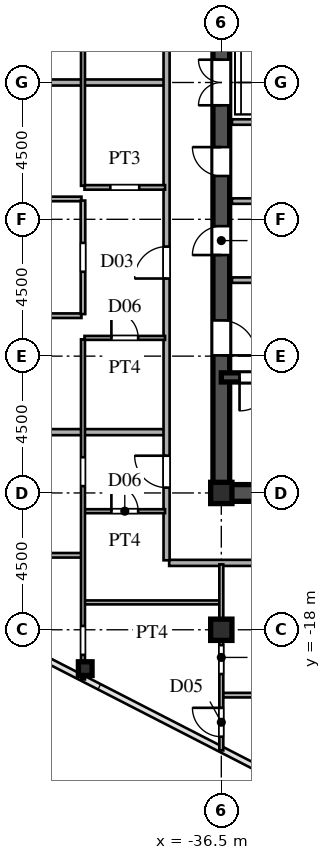
"""IFC4 building model, lengths in metres.
Left out: names, types, materials, properties, quantities, classifications, styles, units other than length and angle.
Written with IfcOpenShell. Run it as: python <this file> out.ifc"""

import sys

from ifc_helpers import new_model, si_unit, direction, frame, frame_2d, origin, origin_2d, place, context, subcontext, project, spatial, rectangle, hollow_rectangle, i_section, extrude, source, transform, mapped, element, fill, save


model = new_model("IFC4")
c1 = context("Model", 3, precision=1e-05, world=origin(), true_north=direction((0.0, 1.0)))
c2 = subcontext(c1, "Body", "Model", "MODEL_VIEW")
j1 = project(units=[si_unit("LENGTHUNIT", "METRE"), si_unit("PLANEANGLEUNIT", "RADIAN")], contexts=[c1])
p1 = place(None, origin())
s1 = spatial("IfcSite", under=j1, at=p1, CompositionType="ELEMENT")
p2 = place(p1, origin())
s2 = spatial("IfcBuilding", under=s1, at=p2, CompositionType="ELEMENT")
p3 = place(p2, frame((0.0, 0.0, 147.6)))
s3 = spatial("IfcBuildingStorey", under=s2, at=p3, CompositionType="ELEMENT", Elevation=147.6)
m1 = source(origin(), c2, "Body", "SweptSolid", [
    extrude(i_section(OverallWidth=0.7, OverallDepth=0.7, WebThickness=0.028, FlangeThickness=0.045, at=origin_2d()), origin(), (0.0, 0.0, 1.0), 3.6),
])
for number, where, z_axis, x_axis in (
    (1, (-36.5, -18.0, 0.0), (0.0, 0.0, 1.0), (1.0, 0.0, 0.0)),
    (2, (-36.5, -13.5, 0.0), (0.0, 0.0, 1.0), (1.0, 0.0, 0.0)),
):
    element("IfcColumn", number, at=place(p3, frame(where, z_axis=z_axis, x_axis=x_axis)), inside=s3, PredefinedType="COLUMN", context=c2, shape_type="MappedRepresentation", body=[
        mapped(m1, transform((0.0, 0.0, 0.0), scale=1.0)),
    ])
m2 = source(origin(), c2, "Body", "SweptSolid", [
    extrude(hollow_rectangle(XDim=0.45, YDim=0.45, WallThickness=0.018, at=origin_2d()), origin(), (0.0, 0.0, 1.0), 3.6),
])
p4 = place(p3, frame((-40.976, -19.278, 0.0), z_axis=(0.0, 0.0, 1.0), x_axis=(1.0, 0.0, 0.0)))
e3 = element("IfcColumn", 3, at=p4, inside=s3, PredefinedType="COLUMN", context=c2, shape_type="MappedRepresentation", body=[
    mapped(m2, transform((0.0, 0.0, 0.0), scale=1.0)),
])
p5 = place(p3, frame((-36.5, -13.5, 0.0), z_axis=(0.0, 0.0, 1.0), x_axis=(1.0, 0.0, 0.0)))
e4 = element("IfcWall", 4, at=p5, inside=s3, PredefinedType="SHEAR", context=c2, shape_type="SweptSolid", body=[
    extrude(rectangle(XDim=9.0, YDim=0.55, at=frame_2d((4.5, 0.0))), origin(), (0.0, 0.0, 1.0), 3.38),
])
p6 = place(p3, frame((-36.5, -13.65, 0.0), z_axis=(0.0, 0.0, 1.0), x_axis=(0.0, 1.0, 0.0)))
e5 = element("IfcWall", 5, at=p6, inside=s3, PredefinedType="SHEAR", context=c2, shape_type="SweptSolid", body=[
    extrude(rectangle(XDim=7.15, YDim=0.55, at=frame_2d((3.575, 0.0))), origin(), (0.0, 0.0, 1.0), 3.38),
])
p7 = place(p6, frame((4.675, 0.0, 0.0)))
e6 = element("IfcOpeningElement", 6, at=p7, cuts=e5, PredefinedType="OPENING", context=c2, shape_type="SweptSolid", body=[
    extrude(rectangle(XDim=1.15, YDim=2.2, at=frame_2d((0.575, 1.1))), frame((0.0, 0.285, 0.0), z_axis=(0.0, -1.0, 0.0), x_axis=(1.0, 0.0, 0.0)), (0.0, 0.0, 1.0), 0.57),
])
p8 = place(p3, frame((-36.5, -1.3, 0.0), z_axis=(0.0, 0.0, 1.0), x_axis=(0.0, 1.0, 0.0)))
e7 = element("IfcWall", 7, at=p8, inside=s3, PredefinedType="SHEAR", context=c2, shape_type="SweptSolid", body=[
    extrude(rectangle(XDim=2.6, YDim=0.55, at=frame_2d((1.3, 0.0))), origin(), (0.0, 0.0, 1.0), 3.38),
])
p9 = place(p8, frame((0.55, 0.0, 0.0)))
e8 = element("IfcOpeningElement", 8, at=p9, cuts=e7, PredefinedType="OPENING", context=c2, shape_type="SweptSolid", body=[
    extrude(rectangle(XDim=1.5, YDim=2.3, at=frame_2d((0.75, 1.15))), frame((0.0, 0.285, 0.0), z_axis=(0.0, -1.0, 0.0), x_axis=(1.0, 0.0, 0.0)), (0.0, 0.0, 1.0), 0.57),
])
p10 = place(p3, frame((-36.5, -6.5, 0.0), z_axis=(0.0, 0.0, 1.0), x_axis=(0.0, 1.0, 0.0)))
e9 = element("IfcWall", 9, at=p10, inside=s3, PredefinedType="SHEAR", context=c2, shape_type="SweptSolid", body=[
    extrude(rectangle(XDim=2.6, YDim=0.55, at=frame_2d((1.3, 0.0))), origin(), (0.0, 0.0, 1.0), 3.38),
])
p11 = place(p10, frame((0.825, 0.0, 0.0)))
e10 = element("IfcOpeningElement", 10, at=p11, cuts=e9, PredefinedType="OPENING", context=c2, shape_type="SweptSolid", body=[
    extrude(rectangle(XDim=0.95, YDim=2.15, at=frame_2d((0.475, 1.075))), frame((0.0, 0.285, 0.0), z_axis=(0.0, -1.0, 0.0), x_axis=(1.0, 0.0, 0.0)), (0.0, 0.0, 1.0), 0.57),
])
p12 = place(p3, frame((-36.5, -3.9, 0.0), z_axis=(0.0, 0.0, 1.0), x_axis=(0.0, 1.0, 0.0)))
e11 = element("IfcWall", 11, at=p12, inside=s3, PredefinedType="SHEAR", context=c2, shape_type="SweptSolid", body=[
    extrude(rectangle(XDim=2.6, YDim=0.55, at=frame_2d((1.3, 0.0))), origin(), (0.0, 0.0, 1.0), 3.38),
])
p13 = place(p12, frame((0.825, 0.0, 0.0)))
e12 = element("IfcOpeningElement", 12, at=p13, cuts=e11, PredefinedType="OPENING", context=c2, shape_type="SweptSolid", body=[
    extrude(rectangle(XDim=0.95, YDim=2.15, at=frame_2d((0.475, 1.075))), frame((0.0, 0.285, 0.0), z_axis=(0.0, -1.0, 0.0), x_axis=(1.0, 0.0, 0.0)), (0.0, 0.0, 1.0), 0.57),
])
p14 = place(p3, frame((-36.5, -9.7, 0.0), z_axis=(0.0, 0.0, 1.0), x_axis=(1.0, 0.0, 0.0)))
e13 = element("IfcWall", 13, at=p14, inside=s3, PredefinedType="SHEAR", context=c2, shape_type="SweptSolid", body=[
    extrude(rectangle(XDim=9.0, YDim=0.3, at=frame_2d((4.5, 0.0))), origin(), (0.0, 0.0, 1.0), 3.38),
])
p15 = place(p14, frame((0.6, 0.0, 0.0)))
e14 = element("IfcOpeningElement", 14, at=p15, cuts=e13, PredefinedType="OPENING", context=c2, shape_type="SweptSolid", body=[
    extrude(rectangle(XDim=1.1, YDim=2.2, at=frame_2d((0.55, 1.1))), frame((0.0, 0.16, 0.0), z_axis=(0.0, -1.0, 0.0), x_axis=(1.0, 0.0, 0.0)), (0.0, 0.0, 1.0), 0.32),
])
p16 = place(p3, frame((-36.15, -6.5, 0.0), z_axis=(0.0, 0.0, 1.0), x_axis=(1.0, 0.0, 0.0)))
e15 = element("IfcWall", 15, at=p16, inside=s3, PredefinedType="PARTITIONING", context=c2, shape_type="SweptSolid", body=[
    extrude(rectangle(XDim=5.7, YDim=0.18, at=frame_2d((2.85, 0.0))), origin(), (0.0, 0.0, 1.0), 3.38),
])
for number, where, z_axis, x_axis in (
    (16, (-36.15, -1.3, 0.0), (0.0, 0.0, 1.0), (1.0, 0.0, 0.0)),
    (17, (-36.15, -3.9, 0.0), (0.0, 0.0, 1.0), (1.0, 0.0, 0.0)),
):
    element("IfcWall", number, at=place(p3, frame(where, z_axis=z_axis, x_axis=x_axis)), inside=s3, PredefinedType="PARTITIONING", context=c2, shape_type="SweptSolid", body=[
        extrude(rectangle(XDim=2.95, YDim=0.18, at=frame_2d((1.475, 0.0))), origin(), (0.0, 0.0, 1.0), 3.38),
    ])
p17 = place(p3, frame((-36.45, -20.15, 0.0), z_axis=(0.0, 0.0, 1.0), x_axis=(1.0, 0.0, 0.0)))
e18 = element("IfcWall", 18, at=p17, inside=s3, PredefinedType="PARTITIONING", context=c2, shape_type="SweptSolid", body=[
    extrude(rectangle(XDim=8.649, YDim=0.15, at=frame_2d((4.325, 0.0))), origin(), (0.0, 0.0, 1.0), 3.38),
])
p18 = place(p3, frame((-41.0, -17.1, 0.0), z_axis=(0.0, 0.0, 1.0), x_axis=(1.0, 0.0, 0.0)))
e19 = element("IfcWall", 19, at=p18, inside=s3, PredefinedType="PARTITIONING", context=c2, shape_type="SweptSolid", body=[
    extrude(rectangle(XDim=4.45, YDim=0.13, at=frame_2d((2.225, 0.0))), origin(), (0.0, 0.0, 1.0), 3.38),
])
p19 = place(p3, frame((-38.215, -15.8, 0.0), z_axis=(0.0, 0.0, 1.0), x_axis=(1.0, 0.0, 0.0)))
e20 = element("IfcWall", 20, at=p19, inside=s3, PredefinedType="PARTITIONING", context=c2, shape_type="SweptSolid", body=[
    extrude(rectangle(XDim=10.715, YDim=0.2, at=frame_2d((5.357, 0.0))), origin(), (0.0, 0.0, 1.0), 3.38),
])
p20 = place(p3, frame((-48.977, -15.55, 0.0), z_axis=(0.0, 0.0, 1.0), x_axis=(1.0, 0.0, 0.0)))
e21 = element("IfcWall", 21, at=p20, inside=s3, PredefinedType="PARTITIONING", context=c2, shape_type="SweptSolid", body=[
    extrude(rectangle(XDim=7.877, YDim=0.15, at=frame_2d((3.938, 0.0))), origin(), (0.0, 0.0, 1.0), 3.38),
])
p21 = place(p20, frame((3.506, 0.0, 0.0)))
e22 = element("IfcOpeningElement", 22, at=p21, cuts=e21, PredefinedType="OPENING", context=c2, shape_type="SweptSolid", body=[
    extrude(rectangle(XDim=0.95, YDim=2.15, at=frame_2d((0.475, 1.075))), frame((0.0, 0.085, 0.0), z_axis=(0.0, -1.0, 0.0), x_axis=(1.0, 0.0, 0.0)), (0.0, 0.0, 1.0), 0.17),
])
p22 = place(p3, frame((-41.0, -14.1, 0.0), z_axis=(0.0, 0.0, 1.0), x_axis=(1.0, 0.0, 0.0)))
e23 = element("IfcWall", 23, at=p22, inside=s3, PredefinedType="PARTITIONING", context=c2, shape_type="SweptSolid", body=[
    extrude(rectangle(XDim=2.65, YDim=0.13, at=frame_2d((1.325, 0.0))), origin(), (0.0, 0.0, 1.0), 3.38),
])
p23 = place(p22, frame((0.885, 0.0, 0.0)))
e24 = element("IfcOpeningElement", 24, at=p23, cuts=e23, PredefinedType="OPENING", context=c2, shape_type="SweptSolid", body=[
    extrude(rectangle(XDim=0.88, YDim=2.1, at=frame_2d((0.44, 1.05))), frame((0.0, 0.075, 0.0), z_axis=(0.0, -1.0, 0.0), x_axis=(1.0, 0.0, 0.0)), (0.0, 0.0, 1.0), 0.15),
])
p24 = place(p3, frame((-56.844, -11.5, 0.0), z_axis=(0.0, 0.0, 1.0), x_axis=(1.0, 0.0, 0.0)))
e25 = element("IfcWall", 25, at=p24, inside=s3, PredefinedType="PARTITIONING", context=c2, shape_type="SweptSolid", body=[
    extrude(rectangle(XDim=18.464, YDim=0.2, at=frame_2d((9.232, 0.0))), origin(), (0.0, 0.0, 1.0), 3.38),
])
p25 = place(p3, frame((-41.0, -8.4, 0.0), z_axis=(0.0, 0.0, 1.0), x_axis=(1.0, 0.0, 0.0)))
e26 = element("IfcWall", 26, at=p25, inside=s3, PredefinedType="PARTITIONING", context=c2, shape_type="SweptSolid", body=[
    extrude(rectangle(XDim=2.65, YDim=0.13, at=frame_2d((1.325, 0.0))), origin(), (0.0, 0.0, 1.0), 3.38),
])
p26 = place(p25, frame((0.885, 0.0, 0.0)))
e27 = element("IfcOpeningElement", 27, at=p26, cuts=e26, PredefinedType="OPENING", context=c2, shape_type="SweptSolid", body=[
    extrude(rectangle(XDim=0.88, YDim=2.1, at=frame_2d((0.44, 1.05))), frame((0.0, 0.075, 0.0), z_axis=(0.0, -1.0, 0.0), x_axis=(1.0, 0.0, 0.0)), (0.0, 0.0, 1.0), 0.15),
])
p27 = place(p3, frame((-64.338, -7.67, 0.0), z_axis=(0.0, 0.0, 1.0), x_axis=(1.0, 0.0, 0.0)))
e28 = element("IfcWall", 28, at=p27, inside=s3, PredefinedType="PARTITIONING", context=c2, shape_type="SweptSolid", body=[
    extrude(rectangle(XDim=23.238, YDim=0.15, at=frame_2d((11.619, 0.0))), origin(), (0.0, 0.0, 1.0), 3.38),
])
p28 = place(p27, frame((16.088, 0.0, 0.0)))
e29 = element("IfcOpeningElement", 29, at=p28, cuts=e28, PredefinedType="OPENING", context=c2, shape_type="SweptSolid", body=[
    extrude(rectangle(XDim=0.95, YDim=2.15, at=frame_2d((0.475, 1.075))), frame((0.0, 0.085, 0.0), z_axis=(0.0, -1.0, 0.0), x_axis=(1.0, 0.0, 0.0)), (0.0, 0.0, 1.0), 0.17),
])
p29 = place(p3, frame((-69.535, -3.83, 0.0), z_axis=(0.0, 0.0, 1.0), x_axis=(1.0, 0.0, 0.0)))
e30 = element("IfcWall", 30, at=p29, inside=s3, PredefinedType="PARTITIONING", context=c2, shape_type="SweptSolid", body=[
    extrude(rectangle(XDim=28.435, YDim=0.15, at=frame_2d((14.217, 0.0))), origin(), (0.0, 0.0, 1.0), 3.38),
])
p30 = place(p29, frame((21.285, 0.0, 0.0)))
e31 = element("IfcOpeningElement", 31, at=p30, cuts=e30, PredefinedType="OPENING", context=c2, shape_type="SweptSolid", body=[
    extrude(rectangle(XDim=0.95, YDim=2.15, at=frame_2d((0.475, 1.075))), frame((0.0, 0.085, 0.0), z_axis=(0.0, -1.0, 0.0), x_axis=(1.0, 0.0, 0.0)), (0.0, 0.0, 1.0), 0.17),
])
p31 = place(p3, frame((-41.0, -3.45, 0.0), z_axis=(0.0, 0.0, 1.0), x_axis=(1.0, 0.0, 0.0)))
e32 = element("IfcWall", 32, at=p31, inside=s3, PredefinedType="PARTITIONING", context=c2, shape_type="SweptSolid", body=[
    extrude(rectangle(XDim=2.65, YDim=0.15, at=frame_2d((1.325, 0.0))), origin(), (0.0, 0.0, 1.0), 3.38),
])
p32 = place(p31, frame((0.85, 0.0, 0.0)))
e33 = element("IfcOpeningElement", 33, at=p32, cuts=e32, PredefinedType="OPENING", context=c2, shape_type="SweptSolid", body=[
    extrude(rectangle(XDim=0.95, YDim=2.15, at=frame_2d((0.475, 1.075))), frame((0.0, 0.085, 0.0), z_axis=(0.0, -1.0, 0.0), x_axis=(1.0, 0.0, 0.0)), (0.0, 0.0, 1.0), 0.17),
])
p33 = place(p3, frame((-69.505, 0.0, 0.0), z_axis=(0.0, 0.0, 1.0), x_axis=(1.0, 0.0, 0.0)))
e34 = element("IfcWall", 34, at=p33, inside=s3, PredefinedType="PARTITIONING", context=c2, shape_type="SweptSolid", body=[
    extrude(rectangle(XDim=31.125, YDim=0.2, at=frame_2d((15.562, 0.0))), origin(), (0.0, 0.0, 1.0), 3.38),
])
p34 = place(p3, frame((-41.05, -19.634, 0.0), z_axis=(0.0, 0.0, 1.0), x_axis=(0.0, 1.0, 0.0)))
e35 = element("IfcWall", 35, at=p34, inside=s3, PredefinedType="PARTITIONING", context=c2, shape_type="SweptSolid", body=[
    extrude(rectangle(XDim=11.187, YDim=0.13, at=frame_2d((5.594, 0.0))), origin(), (0.0, 0.0, 1.0), 2.99),
])
p35 = place(p34, frame((6.359, 0.0, 0.0)))
e36 = element("IfcOpeningElement", 36, at=p35, cuts=e35, PredefinedType="OPENING", context=c2, shape_type="SweptSolid", body=[
    extrude(rectangle(XDim=0.95, YDim=2.15, at=frame_2d((0.475, 1.075))), frame((0.0, 0.075, 0.0), z_axis=(0.0, -1.0, 0.0), x_axis=(1.0, 0.0, 0.0)), (0.0, 0.0, 1.0), 0.15),
])
p36 = place(p34, frame((0.809, 0.0, 0.0)))
e37 = element("IfcOpeningElement", 37, at=p36, cuts=e35, PredefinedType="OPENING", context=c2, shape_type="SweptSolid", body=[
    extrude(rectangle(XDim=0.95, YDim=2.15, at=frame_2d((0.475, 1.075))), frame((0.0, 0.075, 0.0), z_axis=(0.0, -1.0, 0.0), x_axis=(1.0, 0.0, 0.0)), (0.0, 0.0, 1.0), 0.15),
])
p37 = place(p3, frame((-41.05, -7.617, 0.0), z_axis=(0.0, 0.0, 1.0), x_axis=(0.0, 1.0, 0.0)))
e38 = element("IfcWall", 38, at=p37, inside=s3, PredefinedType="PARTITIONING", context=c2, shape_type="SweptSolid", body=[
    extrude(rectangle(XDim=3.734, YDim=0.15, at=frame_2d((1.867, 0.0))), origin(), (0.0, 0.0, 1.0), 2.99),
])
p38 = place(p37, frame((1.392, 0.0, 0.0)))
e39 = element("IfcOpeningElement", 39, at=p38, cuts=e38, PredefinedType="OPENING", context=c2, shape_type="SweptSolid", body=[
    extrude(rectangle(XDim=0.95, YDim=2.15, at=frame_2d((0.475, 1.075))), frame((0.0, 0.085, 0.0), z_axis=(0.0, -1.0, 0.0), x_axis=(1.0, 0.0, 0.0)), (0.0, 0.0, 1.0), 0.17),
])
p39 = place(p3, frame((-41.05, -3.398, 0.0), z_axis=(0.0, 0.0, 1.0), x_axis=(0.0, 1.0, 0.0)))
e40 = element("IfcWall", 40, at=p39, inside=s3, PredefinedType="PARTITIONING", context=c2, shape_type="SweptSolid", body=[
    extrude(rectangle(XDim=23.032, YDim=0.13, at=frame_2d((11.516, 0.0))), origin(), (0.0, 0.0, 1.0), 2.99),
])
p40 = place(p39, frame((6.772, 0.0, 0.0)))
e41 = element("IfcOpeningElement", 41, at=p40, cuts=e40, PredefinedType="OPENING", context=c2, shape_type="SweptSolid", body=[
    extrude(rectangle(XDim=0.95, YDim=2.15, at=frame_2d((0.475, 1.075))), frame((0.0, 0.075, 0.0), z_axis=(0.0, -1.0, 0.0), x_axis=(1.0, 0.0, 0.0)), (0.0, 0.0, 1.0), 0.15),
])
p41 = place(p39, frame((8.924, 0.0, 0.0)))
e42 = element("IfcOpeningElement", 42, at=p41, cuts=e40, PredefinedType="OPENING", context=c2, shape_type="SweptSolid", body=[
    extrude(rectangle(XDim=0.95, YDim=2.15, at=frame_2d((0.475, 1.075))), frame((0.0, 0.075, 0.0), z_axis=(0.0, -1.0, 0.0), x_axis=(1.0, 0.0, 0.0)), (0.0, 0.0, 1.0), 0.15),
])
p42 = place(p39, frame((14.321, 0.0, 0.0)))
e43 = element("IfcOpeningElement", 43, at=p42, cuts=e40, PredefinedType="OPENING", context=c2, shape_type="SweptSolid", body=[
    extrude(rectangle(XDim=0.95, YDim=2.15, at=frame_2d((0.475, 1.075))), frame((0.0, 0.075, 0.0), z_axis=(0.0, -1.0, 0.0), x_axis=(1.0, 0.0, 0.0)), (0.0, 0.0, 1.0), 0.15),
])
p43 = place(p39, frame((21.273, 0.0, 0.0)))
e44 = element("IfcOpeningElement", 44, at=p43, cuts=e40, PredefinedType="OPENING", context=c2, shape_type="SweptSolid", body=[
    extrude(rectangle(XDim=0.95, YDim=2.15, at=frame_2d((0.475, 1.075))), frame((0.0, 0.075, 0.0), z_axis=(0.0, -1.0, 0.0), x_axis=(1.0, 0.0, 0.0)), (0.0, 0.0, 1.0), 0.15),
])
p44 = place(p3, frame((-38.3, -15.715, 0.0), z_axis=(0.0, 0.0, 1.0), x_axis=(0.0, 1.0, 0.0)))
e45 = element("IfcWall", 45, at=p44, inside=s3, PredefinedType="PARTITIONING", context=c2, shape_type="SweptSolid", body=[
    extrude(rectangle(XDim=31.43, YDim=0.2, at=frame_2d((15.715, 0.0))), origin(), (0.0, 0.0, 1.0), 3.38),
])
p45 = place(p44, frame((2.39, 0.0, 0.0)))
e46 = element("IfcOpeningElement", 46, at=p45, cuts=e45, PredefinedType="OPENING", context=c2, shape_type="SweptSolid", body=[
    extrude(rectangle(XDim=1.05, YDim=2.25, at=frame_2d((0.525, 1.125))), frame((0.0, 0.11, 0.0), z_axis=(0.0, -1.0, 0.0), x_axis=(1.0, 0.0, 0.0)), (0.0, 0.0, 1.0), 0.22),
])
p46 = place(p44, frame((9.268, 0.0, 0.0)))
e47 = element("IfcOpeningElement", 47, at=p46, cuts=e45, PredefinedType="OPENING", context=c2, shape_type="SweptSolid", body=[
    extrude(rectangle(XDim=1.05, YDim=2.25, at=frame_2d((0.525, 1.125))), frame((0.0, 0.11, 0.0), z_axis=(0.0, -1.0, 0.0), x_axis=(1.0, 0.0, 0.0)), (0.0, 0.0, 1.0), 0.22),
])
p47 = place(p44, frame((20.04, 0.0, 0.0)))
e48 = element("IfcOpeningElement", 48, at=p47, cuts=e45, PredefinedType="OPENING", context=c2, shape_type="SweptSolid", body=[
    extrude(rectangle(XDim=1.05, YDim=2.25, at=frame_2d((0.525, 1.125))), frame((0.0, 0.11, 0.0), z_axis=(0.0, -1.0, 0.0), x_axis=(1.0, 0.0, 0.0)), (0.0, 0.0, 1.0), 0.22),
])
p48 = place(p44, frame((26.587, 0.0, 0.0)))
e49 = element("IfcOpeningElement", 49, at=p48, cuts=e45, PredefinedType="OPENING", context=c2, shape_type="SweptSolid", body=[
    extrude(rectangle(XDim=1.05, YDim=2.25, at=frame_2d((0.525, 1.125))), frame((0.0, 0.11, 0.0), z_axis=(0.0, -1.0, 0.0), x_axis=(1.0, 0.0, 0.0)), (0.0, 0.0, 1.0), 0.22),
])
p49 = place(p3, frame((-36.5, -21.969, 0.0), z_axis=(0.0, 0.0, 1.0), x_axis=(0.0, 1.0, 0.0)))
e50 = element("IfcWall", 50, at=p49, inside=s3, PredefinedType="PARTITIONING", context=c2, shape_type="SweptSolid", body=[
    extrude(rectangle(XDim=6.119, YDim=0.13, at=frame_2d((3.06, 0.0))), origin(), (0.0, 0.0, 1.0), 2.78),
])
p50 = place(p49, frame((0.452, 0.0, 0.0)))
e51 = element("IfcOpeningElement", 51, at=p50, cuts=e50, PredefinedType="OPENING", context=c2, shape_type="SweptSolid", body=[
    extrude(rectangle(XDim=0.95, YDim=2.15, at=frame_2d((0.475, 1.075))), frame((0.0, 0.075, 0.0), z_axis=(0.0, -1.0, 0.0), x_axis=(1.0, 0.0, 0.0)), (0.0, 0.0, 1.0), 0.15),
])
p51 = place(p49, frame((2.513, 0.0, 0.0)))
e52 = element("IfcOpeningElement", 52, at=p51, cuts=e50, PredefinedType="OPENING", context=c2, shape_type="SweptSolid", body=[
    extrude(rectangle(XDim=0.95, YDim=2.15, at=frame_2d((0.475, 1.075))), frame((0.0, 0.075, 0.0), z_axis=(0.0, -1.0, 0.0), x_axis=(1.0, 0.0, 0.0)), (0.0, 0.0, 1.0), 0.15),
])
m3 = source(origin(), c2, "Body", "SweptSolid", [
    extrude(rectangle(XDim=1.15, YDim=2.2, at=frame_2d((0.575, 1.1))), frame((0.0, 0.025, 0.0), z_axis=(0.0, -1.0, 0.0), x_axis=(1.0, 0.0, 0.0)), (0.0, 0.0, 1.0), 0.05),
])
p52 = place(p7, frame((1.15, 0.0, 0.0), z_axis=(0.0, 0.0, 1.0), x_axis=(-1.0, 0.0, 0.0)))
e53 = element("IfcDoor", 53, at=p52, inside=s3, OperationType="SINGLE_SWING_LEFT", PredefinedType="DOOR", context=c2, shape_type="MappedRepresentation", body=[
    mapped(m3, transform((0.0, 0.0, 0.0), scale=1.0)),
])
fill(e6, e53)
m4 = source(origin(), c2, "Body", "SweptSolid", [
    extrude(rectangle(XDim=1.5, YDim=2.3, at=frame_2d((0.75, 1.15))), frame((0.0, 0.025, 0.0), z_axis=(0.0, -1.0, 0.0), x_axis=(1.0, 0.0, 0.0)), (0.0, 0.0, 1.0), 0.05),
])
p53 = place(p9, origin())
e54 = element("IfcDoor", 54, at=p53, inside=s3, OperationType="DOUBLE_SWING_LEFT", PredefinedType="DOOR", context=c2, shape_type="MappedRepresentation", body=[
    mapped(m4, transform((0.0, 0.0, 0.0), scale=1.0)),
])
fill(e8, e54)
m5 = source(origin(), c2, "Body", "SweptSolid", [
    extrude(rectangle(XDim=0.95, YDim=2.15, at=frame_2d((0.475, 1.075))), frame((0.0, 0.025, 0.0), z_axis=(0.0, -1.0, 0.0), x_axis=(1.0, 0.0, 0.0)), (0.0, 0.0, 1.0), 0.05),
])
p54 = place(p11, origin())
e55 = element("IfcDoor", 55, at=p54, inside=s3, OperationType="SINGLE_SWING_LEFT", PredefinedType="DOOR", context=c2, shape_type="MappedRepresentation", body=[
    mapped(m5, transform((0.0, 0.0, 0.0), scale=1.0)),
])
fill(e10, e55)
p55 = place(p13, origin())
e56 = element("IfcDoor", 56, at=p55, inside=s3, OperationType="SINGLE_SWING_RIGHT", PredefinedType="DOOR", context=c2, shape_type="MappedRepresentation", body=[
    mapped(m5, transform((0.0, 0.0, 0.0), scale=1.0)),
])
fill(e12, e56)
m6 = source(origin(), c2, "Body", "SweptSolid", [
    extrude(rectangle(XDim=1.1, YDim=2.2, at=frame_2d((0.55, 1.1))), frame((0.0, 0.025, 0.0), z_axis=(0.0, -1.0, 0.0), x_axis=(1.0, 0.0, 0.0)), (0.0, 0.0, 1.0), 0.05),
])
p56 = place(p15, frame((1.1, 0.0, 0.0), z_axis=(0.0, 0.0, 1.0), x_axis=(-1.0, 0.0, 0.0)))
e57 = element("IfcDoor", 57, at=p56, inside=s3, OperationType="SINGLE_SWING_LEFT", PredefinedType="DOOR", context=c2, shape_type="MappedRepresentation", body=[
    mapped(m6, transform((0.0, 0.0, 0.0), scale=1.0)),
])
fill(e14, e57)
m7 = source(origin(), c2, "Body", "SweptSolid", [
    extrude(rectangle(XDim=0.88, YDim=2.1, at=frame_2d((0.44, 1.05))), frame((0.0, 0.025, 0.0), z_axis=(0.0, -1.0, 0.0), x_axis=(1.0, 0.0, 0.0)), (0.0, 0.0, 1.0), 0.05),
])
p57 = place(p23, origin())
e58 = element("IfcDoor", 58, at=p57, inside=s3, OperationType="SINGLE_SWING_LEFT", PredefinedType="DOOR", context=c2, shape_type="MappedRepresentation", body=[
    mapped(m7, transform((0.0, 0.0, 0.0), scale=1.0)),
])
fill(e24, e58)
p58 = place(p26, origin())
e59 = element("IfcDoor", 59, at=p58, inside=s3, OperationType="SINGLE_SWING_LEFT", PredefinedType="DOOR", context=c2, shape_type="MappedRepresentation", body=[
    mapped(m7, transform((0.0, 0.0, 0.0), scale=1.0)),
])
fill(e27, e59)
m8 = source(origin(), c2, "Body", "SweptSolid", [
    extrude(rectangle(XDim=1.05, YDim=2.25, at=frame_2d((0.525, 1.125))), frame((0.0, 0.025, 0.0), z_axis=(0.0, -1.0, 0.0), x_axis=(1.0, 0.0, 0.0)), (0.0, 0.0, 1.0), 0.05),
])
p59 = place(p45, origin())
e60 = element("IfcDoor", 60, at=p59, inside=s3, OperationType="SINGLE_SWING_RIGHT", PredefinedType="DOOR", context=c2, shape_type="MappedRepresentation", body=[
    mapped(m8, transform((0.0, 0.0, 0.0), scale=1.0)),
])
fill(e46, e60)
p60 = place(p46, origin())
e61 = element("IfcDoor", 61, at=p60, inside=s3, OperationType="SINGLE_SWING_LEFT", PredefinedType="DOOR", context=c2, shape_type="MappedRepresentation", body=[
    mapped(m8, transform((0.0, 0.0, 0.0), scale=1.0)),
])
fill(e47, e61)
m9 = source(origin(), c2, "Body", "SweptSolid", [
    extrude(rectangle(XDim=0.95, YDim=2.15, at=frame_2d((0.475, 1.075))), frame((0.0, 0.025, 0.0), z_axis=(0.0, -1.0, 0.0), x_axis=(1.0, 0.0, 0.0)), (0.0, 0.0, 1.0), 0.05),
])
p61 = place(p50, origin())
e62 = element("IfcDoor", 62, at=p61, inside=s3, OperationType="SINGLE_SWING_RIGHT", PredefinedType="DOOR", context=c2, shape_type="MappedRepresentation", body=[
    mapped(m9, transform((0.0, 0.0, 0.0), scale=1.0)),
])
fill(e51, e62)
save(model, sys.argv[1])
